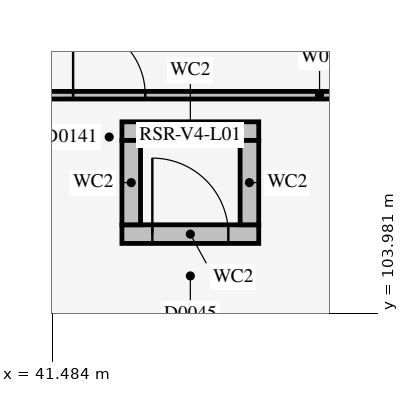
"""IFC4 building model, lengths in metres.
Left out: names, types, materials, properties, quantities, classifications, styles, units other than length and angle.
Written with IfcOpenShell. Run it as: python <this file> out.ifc"""

import sys

from ifc_helpers import new_model, si_unit, direction, frame, frame_2d, origin, place, context, subcontext, project, spatial, rectangle, extrude, element, fill, save


model = new_model("IFC4")
c1 = context("Model", 3, precision=1e-05, world=origin(), true_north=direction((0.0, 1.0)))
c2 = subcontext(c1, "Body", "Model", "MODEL_VIEW")
j1 = project(units=[si_unit("LENGTHUNIT", "METRE"), si_unit("PLANEANGLEUNIT", "RADIAN")], contexts=[c1])
p1 = place(None, origin())
s1 = spatial("IfcSite", under=j1, at=p1, CompositionType="ELEMENT")
p2 = place(p1, origin())
s2 = spatial("IfcBuilding", under=s1, at=p2, CompositionType="ELEMENT")
p3 = place(p2, frame((0.0, 0.0, 5.4)))
s3 = spatial("IfcBuildingStorey", under=s2, at=p3, CompositionType="ELEMENT", Elevation=5.4)
p4 = place(p3, frame((42.4, 105.022, 0.0), z_axis=(0.0, 0.0, 1.0), x_axis=(1.0, 0.0, 0.0)))
e1 = element("IfcWall", 1, at=p4, inside=s3, PredefinedType="SOLIDWALL", context=c2, shape_type="SweptSolid", body=[
    extrude(rectangle(XDim=1.8, YDim=0.245, at=frame_2d((0.9, 0.0))), origin(), (0.0, 0.0, 1.0), 4.565),
])
p5 = place(p4, frame((0.4, 0.0, 0.0)))
e2 = element("IfcOpeningElement", 2, at=p5, cuts=e1, PredefinedType="OPENING", context=c2, shape_type="SweptSolid", body=[
    extrude(rectangle(XDim=1.0, YDim=2.2, at=frame_2d((0.5, 1.1))), frame((0.0, 0.135, 0.0), z_axis=(0.0, -1.0, 0.0), x_axis=(1.0, 0.0, 0.0)), (0.0, 0.0, 1.0), 0.269),
])
p6 = place(p3, frame((42.4, 106.377, 0.0), z_axis=(0.0, 0.0, 1.0), x_axis=(1.0, 0.0, 0.0)))
e3 = element("IfcWall", 3, at=p6, inside=s3, PredefinedType="SOLIDWALL", context=c2, shape_type="SweptSolid", body=[
    extrude(rectangle(XDim=1.8, YDim=0.245, at=frame_2d((0.9, 0.0))), origin(), (0.0, 0.0, 1.0), 4.565),
])
for number, where, z_axis, x_axis in (
    (4, (44.077, 105.145, 0.0), (0.0, 0.0, 1.0), (0.0, 1.0, 0.0)),
    (5, (42.522, 105.145, 0.0), (0.0, 0.0, 1.0), (0.0, 1.0, 0.0)),
):
    element("IfcWall", number, at=place(p3, frame(where, z_axis=z_axis, x_axis=x_axis)), inside=s3, PredefinedType="SOLIDWALL", context=c2, shape_type="SweptSolid", body=[
        extrude(rectangle(XDim=1.11, YDim=0.245, at=frame_2d((0.555, 0.0))), origin(), (0.0, 0.0, 1.0), 4.565),
    ])
p7 = place(p3, frame((38.44, 106.85, 0.0), z_axis=(0.0, 0.0, 1.0), x_axis=(1.0, 0.0, 0.0)))
e6 = element("IfcWall", 6, at=p7, inside=s3, PredefinedType="PARTITIONING", context=c2, shape_type="SweptSolid", body=[
    extrude(rectangle(XDim=13.12, YDim=0.1, at=frame_2d((6.56, 0.0))), origin(), (0.0, 0.0, 1.0), 4.565),
])
p8 = place(p7, frame((3.317, 0.0, 0.0)))
e7 = element("IfcOpeningElement", 7, at=p8, cuts=e6, PredefinedType="OPENING", context=c2, shape_type="SweptSolid", body=[
    extrude(rectangle(XDim=0.95, YDim=2.15, at=frame_2d((0.475, 1.075))), frame((0.0, 0.062, 0.0), z_axis=(0.0, -1.0, 0.0), x_axis=(1.0, 0.0, 0.0)), (0.0, 0.0, 1.0), 0.124),
])
p9 = place(p5, origin())
e8 = element("IfcDoor", 8, at=p9, inside=s3, OperationType="SINGLE_SWING_LEFT", PredefinedType="DOOR", context=c2, shape_type="SweptSolid", body=[
    extrude(rectangle(XDim=1.0, YDim=2.2, at=frame_2d((0.5, 1.1))), frame((0.0, 0.025, 0.0), z_axis=(0.0, -1.0, 0.0), x_axis=(1.0, 0.0, 0.0)), (0.0, 0.0, 1.0), 0.05),
])
fill(e2, e8)
p10 = place(p8, origin())
e9 = element("IfcDoor", 9, at=p10, inside=s3, OperationType="SINGLE_SWING_LEFT", PredefinedType="DOOR", context=c2, shape_type="SweptSolid", body=[
    extrude(rectangle(XDim=0.95, YDim=2.15, at=frame_2d((0.475, 1.075))), frame((0.0, 0.025, 0.0), z_axis=(0.0, -1.0, 0.0), x_axis=(1.0, 0.0, 0.0)), (0.0, 0.0, 1.0), 0.05),
])
fill(e7, e9)
save(model, sys.argv[1])
